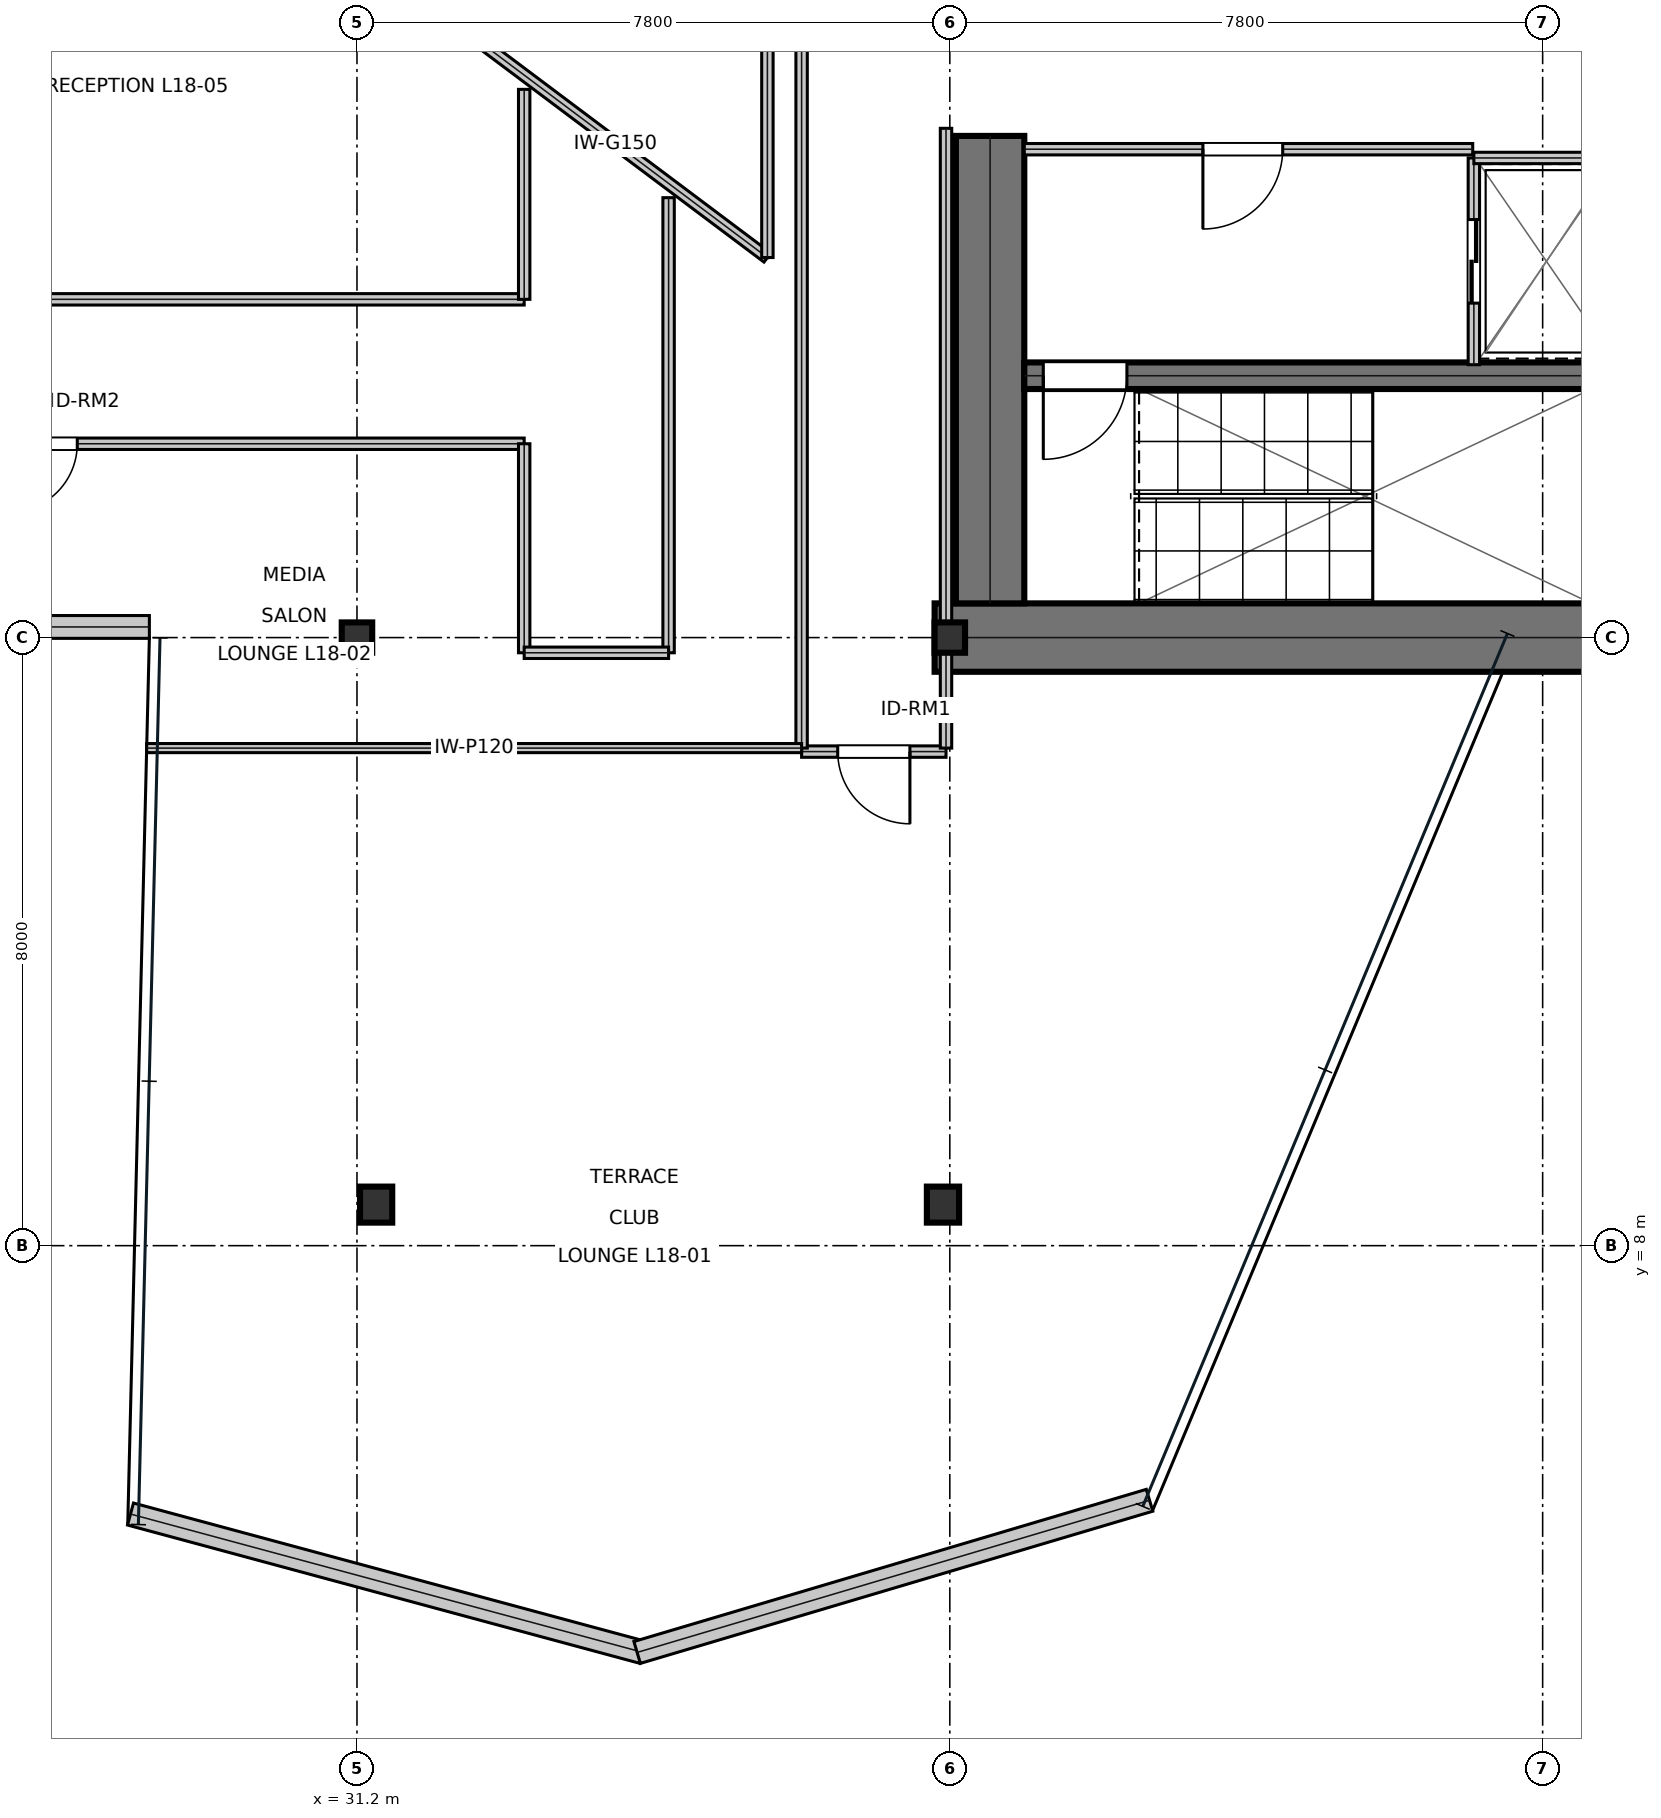
"""IFC4 building model, lengths in metres.
Left out: names, types, materials, properties, quantities, classifications, styles, units other than length and angle.
Written with IfcOpenShell. Run it as: python <this file> out.ifc"""

import sys

from ifc_helpers import new_model, si_unit, direction, frame, frame_2d, origin, origin_2d, place, context, subcontext, project, spatial, rectangle, i_section, extrude, element, fill, save


model = new_model("IFC4")
c1 = context("Model", 3, precision=1e-05, world=origin(), true_north=direction((0.0, 1.0)))
c2 = subcontext(c1, "Body", "Model", "MODEL_VIEW")
j1 = project(units=[si_unit("LENGTHUNIT", "METRE"), si_unit("PLANEANGLEUNIT", "RADIAN")], contexts=[c1])
p1 = place(None, origin())
s1 = spatial("IfcSite", under=j1, at=p1, CompositionType="ELEMENT")
p2 = place(p1, origin())
s2 = spatial("IfcBuilding", under=s1, at=p2, CompositionType="ELEMENT")
p3 = place(p2, frame((0.0, 0.0, 82.35)))
s3 = spatial("IfcBuildingStorey", under=s2, at=p3, CompositionType="ELEMENT", Elevation=82.35)
p4 = place(p3, frame((38.8, 16.0, 0.0), z_axis=(0.0, 0.0, 1.0), x_axis=(1.0, 0.0, 0.0)))
e1 = element("IfcWall", 1, at=p4, inside=s3, PredefinedType="SHEAR", context=c2, shape_type="SweptSolid", body=[
    extrude(rectangle(XDim=16.0, YDim=0.9, at=frame_2d((8.0, 0.0))), origin(), (0.0, 0.0, 1.0), 3.81),
])
p5 = place(p3, frame((39.53, 16.45, 0.0), z_axis=(0.0, 0.0, 1.0), x_axis=(0.0, 1.0, 0.0)))
e2 = element("IfcWall", 2, at=p5, inside=s3, PredefinedType="SHEAR", context=c2, shape_type="SweptSolid", body=[
    extrude(rectangle(XDim=6.15, YDim=0.9, at=frame_2d((3.075, 0.0))), origin(), (0.0, 0.0, 1.0), 3.81),
])
p6 = place(p3, frame((39.98, 19.445, 0.0), z_axis=(0.0, 0.0, 1.0), x_axis=(1.0, 0.0, 0.0)))
e3 = element("IfcWall", 3, at=p6, inside=s3, PredefinedType="SHEAR", context=c2, shape_type="SweptSolid", body=[
    extrude(rectangle(XDim=7.71, YDim=0.35, at=frame_2d((3.855, 0.0))), origin(), (0.0, 0.0, 1.0), 3.81),
])
p7 = place(p6, frame((0.25, 0.0, 0.0)))
e4 = element("IfcOpeningElement", 4, at=p7, cuts=e3, PredefinedType="OPENING", context=c2, shape_type="SweptSolid", body=[
    extrude(rectangle(XDim=1.1, YDim=2.15, at=frame_2d((0.55, 1.075))), frame((0.0, 0.185, 0.0), z_axis=(0.0, -1.0, 0.0), x_axis=(1.0, 0.0, 0.0)), (0.0, 0.0, 1.0), 0.37),
])
for number, where, z_axis, x_axis in (
    (5, (31.2, 16.0, 0.0), (0.0, 0.0, 1.0), (1.0, 0.0, 0.0)),
    (6, (39.0, 16.0, 0.0), (0.0, 0.0, 1.0), (1.0, 0.0, 0.0)),
):
    element("IfcColumn", number, at=place(p3, frame(where, z_axis=z_axis, x_axis=x_axis)), inside=s3, PredefinedType="COLUMN", context=c2, shape_type="SweptSolid", body=[
        extrude(i_section(OverallWidth=0.401, OverallDepth=0.399, WebThickness=0.025, FlangeThickness=0.04, at=origin_2d()), origin(), (0.0, 0.0, 1.0), 4.044),
    ])
p8 = place(p3, frame((31.452, 8.54, 0.016), z_axis=(0.013967388966, 0.029817339053, 0.999457772163), x_axis=(-0.905569653976, 0.424197597586, 0.0)))
e7 = element("IfcColumn", 7, at=p8, inside=s3, PredefinedType="COLUMN", context=c2, shape_type="SweptSolid", body=[
    extrude(i_section(OverallWidth=0.424, OverallDepth=0.474, WebThickness=0.048, FlangeThickness=0.077, at=origin_2d()), origin(), (0.0, 0.0, 1.0), 4.02),
])
p9 = place(p3, frame((38.91, 8.54, 0.016), z_axis=(-0.004980101856, 0.029819878186, 0.999542882247), x_axis=(-0.986339577116, -0.164724735893, 0.0)))
e8 = element("IfcColumn", 8, at=p9, inside=s3, PredefinedType="COLUMN", context=c2, shape_type="SweptSolid", body=[
    extrude(i_section(OverallWidth=0.424, OverallDepth=0.474, WebThickness=0.048, FlangeThickness=0.077, at=origin_2d()), origin(), (0.0, 0.0, 1.0), 4.02),
])
p10 = place(p3, frame((25.688, 16.14, 0.0), z_axis=(0.0, 0.0, 1.0), x_axis=(1.0, 0.0, 0.0)))
e9 = element("IfcWall", 9, at=p10, inside=s3, PredefinedType="STANDARD", context=c2, shape_type="SweptSolid", body=[
    extrude(rectangle(XDim=2.781, YDim=0.3, at=frame_2d((1.39, 0.0))), origin(), (0.0, 0.0, 1.0), 3.81),
])
p11 = place(p3, frame((28.22, 4.469, 0.0), z_axis=(0.0, 0.0, 1.0), x_axis=(0.965438319853, -0.260631637679, 0.0)))
e10 = element("IfcWall", 10, at=p11, inside=s3, PredefinedType="STANDARD", context=c2, shape_type="SweptSolid", body=[
    extrude(rectangle(XDim=6.983, YDim=0.3, at=frame_2d((3.492, 0.0))), origin(), (0.0, 0.0, 1.0), 3.81),
])
p12 = place(p3, frame((34.886, 2.648, 0.0), z_axis=(0.0, 0.0, 1.0), x_axis=(0.958632659024, 0.284646140064, 0.0)))
e11 = element("IfcWall", 11, at=p12, inside=s3, PredefinedType="STANDARD", context=c2, shape_type="SweptSolid", body=[
    extrude(rectangle(XDim=7.033, YDim=0.3, at=frame_2d((3.517, 0.0))), origin(), (0.0, 0.0, 1.0), 3.81),
])
p13 = place(p3, frame((39.98, 22.425, 0.0), z_axis=(0.0, 0.0, 1.0), x_axis=(1.0, 0.0, 0.0)))
e12 = element("IfcWall", 12, at=p13, inside=s3, PredefinedType="PARTITIONING", context=c2, shape_type="SweptSolid", body=[
    extrude(rectangle(XDim=5.9, YDim=0.15, at=frame_2d((2.95, 0.0))), origin(), (0.0, 0.0, 1.0), 3.81),
])
p14 = place(p13, frame((2.35, 0.0, 0.0)))
e13 = element("IfcOpeningElement", 13, at=p14, cuts=e12, PredefinedType="OPENING", context=c2, shape_type="SweptSolid", body=[
    extrude(rectangle(XDim=1.05, YDim=2.15, at=frame_2d((0.525, 1.075))), frame((0.0, 0.085, 0.0), z_axis=(0.0, -1.0, 0.0), x_axis=(1.0, 0.0, 0.0)), (0.0, 0.0, 1.0), 0.17),
])
p15 = place(p3, frame((45.895, 19.59, 0.0), z_axis=(0.0, 0.0, 1.0), x_axis=(0.0, 1.0, 0.0)))
e14 = element("IfcWall", 14, at=p15, inside=s3, PredefinedType="PARTITIONING", context=c2, shape_type="SweptSolid", body=[
    extrude(rectangle(XDim=2.72, YDim=0.15, at=frame_2d((1.36, 0.0))), origin(), (0.0, 0.0, 1.0), 3.81),
])
p16 = place(p15, frame((0.81, 0.0, 0.0)))
e15 = element("IfcOpeningElement", 15, at=p16, cuts=e14, PredefinedType="OPENING", context=c2, shape_type="SweptSolid", body=[
    extrude(rectangle(XDim=1.1, YDim=2.15, at=frame_2d((0.55, 1.075))), frame((0.0, 0.085, 0.0), z_axis=(0.0, -1.0, 0.0), x_axis=(1.0, 0.0, 0.0)), (0.0, 0.0, 1.0), 0.17),
])
p17 = place(p3, frame((45.895, 22.31, 0.0), z_axis=(0.0, 0.0, 1.0), x_axis=(1.0, 0.0, 0.0)))
e16 = element("IfcWall", 16, at=p17, inside=s3, PredefinedType="PARTITIONING", context=c2, shape_type="SweptSolid", body=[
    extrude(rectangle(XDim=1.915, YDim=0.15, at=frame_2d((0.958, 0.0))), origin(), (0.0, 0.0, 1.0), 3.81),
])
p18 = place(p3, frame((37.05, 14.5, 0.0), z_axis=(0.0, 0.0, 1.0), x_axis=(1.0, 0.0, 0.0)))
e17 = element("IfcWall", 17, at=p18, inside=s3, PredefinedType="PARTITIONING", context=c2, shape_type="SweptSolid", body=[
    extrude(rectangle(XDim=1.9, YDim=0.15, at=frame_2d((0.95, 0.0))), origin(), (0.0, 0.0, 1.0), 3.181),
])
p19 = place(p18, frame((0.475, 0.0, 0.0)))
e18 = element("IfcOpeningElement", 18, at=p19, cuts=e17, PredefinedType="OPENING", context=c2, shape_type="SweptSolid", body=[
    extrude(rectangle(XDim=0.95, YDim=2.15, at=frame_2d((0.475, 1.075))), frame((0.0, 0.085, 0.0), z_axis=(0.0, -1.0, 0.0), x_axis=(1.0, 0.0, 0.0)), (0.0, 0.0, 1.0), 0.17),
])
p20 = place(p3, frame((14.62, 18.55, 0.0), z_axis=(0.0, 0.0, 1.0), x_axis=(1.0, 0.0, 0.0)))
e19 = element("IfcWall", 19, at=p20, inside=s3, PredefinedType="PARTITIONING", context=c2, shape_type="SweptSolid", body=[
    extrude(rectangle(XDim=18.78, YDim=0.15, at=frame_2d((9.39, 0.0))), origin(), (0.0, 0.0, 1.0), 3.181),
])
p21 = place(p20, frame((12.0, 0.0, 0.0)))
e20 = element("IfcOpeningElement", 20, at=p21, cuts=e19, PredefinedType="OPENING", context=c2, shape_type="SweptSolid", body=[
    extrude(rectangle(XDim=0.9, YDim=2.15, at=frame_2d((0.45, 1.075))), frame((0.0, 0.085, 0.0), z_axis=(0.0, -1.0, 0.0), x_axis=(1.0, 0.0, 0.0)), (0.0, 0.0, 1.0), 0.17),
])
p22 = place(p3, frame((38.95, 14.546, 0.0), z_axis=(0.0, 0.0, 1.0), x_axis=(0.0, 1.0, 0.0)))
e21 = element("IfcWall", 21, at=p22, inside=s3, PredefinedType="PARTITIONING", context=c2, shape_type="SweptSolid", body=[
    extrude(rectangle(XDim=8.154, YDim=0.15, at=frame_2d((4.077, 0.0))), origin(), (0.0, 0.0, 1.0), 3.181),
])
p23 = place(p3, frame((37.05, 14.546, 0.0), z_axis=(0.0, 0.0, 1.0), x_axis=(0.0, 1.0, 0.0)))
e22 = element("IfcWall", 22, at=p23, inside=s3, PredefinedType="PARTITIONING", context=c2, shape_type="SweptSolid", body=[
    extrude(rectangle(XDim=13.004, YDim=0.15, at=frame_2d((6.502, 0.0))), origin(), (0.0, 0.0, 1.0), 3.181),
])
p24 = place(p3, frame((35.3, 15.8, 0.0), z_axis=(0.0, 0.0, 1.0), x_axis=(0.0, 1.0, 0.0)))
e23 = element("IfcWall", 23, at=p24, inside=s3, PredefinedType="PARTITIONING", context=c2, shape_type="SweptSolid", body=[
    extrude(rectangle(XDim=5.988, YDim=0.15, at=frame_2d((2.994, 0.0))), origin(), (0.0, 0.0, 1.0), 3.181),
])
p25 = place(p3, frame((33.4, 15.8, 0.0), z_axis=(0.0, 0.0, 1.0), x_axis=(0.0, 1.0, 0.0)))
e24 = element("IfcWall", 24, at=p25, inside=s3, PredefinedType="PARTITIONING", context=c2, shape_type="SweptSolid", body=[
    extrude(rectangle(XDim=2.75, YDim=0.15, at=frame_2d((1.375, 0.0))), origin(), (0.0, 0.0, 1.0), 3.181),
])
p26 = place(p3, frame((33.4, 15.8, 0.0), z_axis=(0.0, 0.0, 1.0), x_axis=(1.0, 0.0, 0.0)))
e25 = element("IfcWall", 25, at=p26, inside=s3, PredefinedType="PARTITIONING", context=c2, shape_type="SweptSolid", body=[
    extrude(rectangle(XDim=1.9, YDim=0.15, at=frame_2d((0.95, 0.0))), origin(), (0.0, 0.0, 1.0), 3.181),
])
p27 = place(p3, frame((25.057, 20.45, 0.0), z_axis=(0.0, 0.0, 1.0), x_axis=(1.0, 0.0, 0.0)))
e26 = element("IfcWall", 26, at=p27, inside=s3, PredefinedType="PARTITIONING", context=c2, shape_type="SweptSolid", body=[
    extrude(rectangle(XDim=8.343, YDim=0.15, at=frame_2d((4.171, 0.0))), origin(), (0.0, 0.0, 1.0), 3.181),
])
p28 = place(p3, frame((33.4, 20.45, 0.0), z_axis=(0.0, 0.0, 1.0), x_axis=(0.0, 1.0, 0.0)))
e27 = element("IfcWall", 27, at=p28, inside=s3, PredefinedType="PARTITIONING", context=c2, shape_type="SweptSolid", body=[
    extrude(rectangle(XDim=2.762, YDim=0.15, at=frame_2d((1.381, 0.0))), origin(), (0.0, 0.0, 1.0), 3.81),
])
p29 = place(p3, frame((28.433, 14.546, 0.0), z_axis=(0.0, 0.0, 1.0), x_axis=(1.0, 0.0, 0.0)))
e28 = element("IfcWall", 28, at=p29, inside=s3, PredefinedType="PARTITIONING", context=c2, shape_type="SweptSolid", body=[
    extrude(rectangle(XDim=8.617, YDim=0.12, at=frame_2d((4.309, 0.0))), origin(), (0.0, 0.0, 1.0), 3.338),
])
p30 = place(p3, frame((32.6, 24.0, 0.0), z_axis=(0.0, 0.0, 1.0), x_axis=(0.8, -0.6, 0.0)))
e29 = element("IfcWall", 29, at=p30, inside=s3, PredefinedType="MOVABLE", context=c2, shape_type="SweptSolid", body=[
    extrude(rectangle(XDim=5.0, YDim=0.15, at=frame_2d((2.5, 0.0))), origin(), (0.0, 0.0, 1.0), 3.81),
])
p31 = place(p3, frame((36.6, 21.0, 0.0), z_axis=(0.0, 0.0, 1.0), x_axis=(0.0, 1.0, 0.0)))
e30 = element("IfcWall", 30, at=p31, inside=s3, PredefinedType="MOVABLE", context=c2, shape_type="SweptSolid", body=[
    extrude(rectangle(XDim=6.0, YDim=0.15, at=frame_2d((3.0, 0.0))), origin(), (0.0, 0.0, 1.0), 3.81),
])
p32 = place(p14, frame((1.05, 0.0, 0.0), z_axis=(0.0, 0.0, 1.0), x_axis=(-1.0, 0.0, 0.0)))
e31 = element("IfcDoor", 31, at=p32, inside=s3, OperationType="SINGLE_SWING_RIGHT", PredefinedType="DOOR", context=c2, shape_type="SweptSolid", body=[
    extrude(rectangle(XDim=1.05, YDim=2.15, at=frame_2d((0.525, 1.075))), frame((0.0, 0.025, 0.0), z_axis=(0.0, -1.0, 0.0), x_axis=(1.0, 0.0, 0.0)), (0.0, 0.0, 1.0), 0.05),
])
fill(e13, e31)
p33 = place(p16, frame((1.1, 0.0, 0.0), z_axis=(0.0, 0.0, 1.0), x_axis=(-1.0, 0.0, 0.0)))
e32 = element("IfcDoor", 32, at=p33, inside=s3, OperationType="DOUBLE_DOOR_SLIDING", PredefinedType="DOOR", context=c2, shape_type="SweptSolid", body=[
    extrude(rectangle(XDim=1.1, YDim=2.15, at=frame_2d((0.55, 1.075))), frame((0.0, 0.025, 0.0), z_axis=(0.0, -1.0, 0.0), x_axis=(1.0, 0.0, 0.0)), (0.0, 0.0, 1.0), 0.05),
])
fill(e15, e32)
p34 = place(p19, frame((0.95, 0.0, 0.0), z_axis=(0.0, 0.0, 1.0), x_axis=(-1.0, 0.0, 0.0)))
e33 = element("IfcDoor", 33, at=p34, inside=s3, OperationType="SINGLE_SWING_LEFT", PredefinedType="DOOR", context=c2, shape_type="SweptSolid", body=[
    extrude(rectangle(XDim=0.95, YDim=2.15, at=frame_2d((0.475, 1.075))), frame((0.0, 0.025, 0.0), z_axis=(0.0, -1.0, 0.0), x_axis=(1.0, 0.0, 0.0)), (0.0, 0.0, 1.0), 0.05),
])
fill(e18, e33)
p35 = place(p21, frame((0.9, 0.0, 0.0), z_axis=(0.0, 0.0, 1.0), x_axis=(-1.0, 0.0, 0.0)))
e34 = element("IfcDoor", 34, at=p35, inside=s3, OperationType="SINGLE_SWING_RIGHT", PredefinedType="DOOR", context=c2, shape_type="SweptSolid", body=[
    extrude(rectangle(XDim=0.9, YDim=2.15, at=frame_2d((0.45, 1.075))), frame((0.0, 0.025, 0.0), z_axis=(0.0, -1.0, 0.0), x_axis=(1.0, 0.0, 0.0)), (0.0, 0.0, 1.0), 0.05),
])
fill(e20, e34)
p36 = place(p7, frame((1.1, 0.0, 0.0), z_axis=(0.0, 0.0, 1.0), x_axis=(-1.0, 0.0, 0.0)))
e35 = element("IfcDoor", 35, at=p36, inside=s3, OperationType="SINGLE_SWING_RIGHT", PredefinedType="DOOR", context=c2, shape_type="SweptSolid", body=[
    extrude(rectangle(XDim=1.1, YDim=2.15, at=frame_2d((0.55, 1.075))), frame((0.0, 0.025, 0.0), z_axis=(0.0, -1.0, 0.0), x_axis=(1.0, 0.0, 0.0)), (0.0, 0.0, 1.0), 0.05),
])
fill(e4, e35)
save(model, sys.argv[1])
